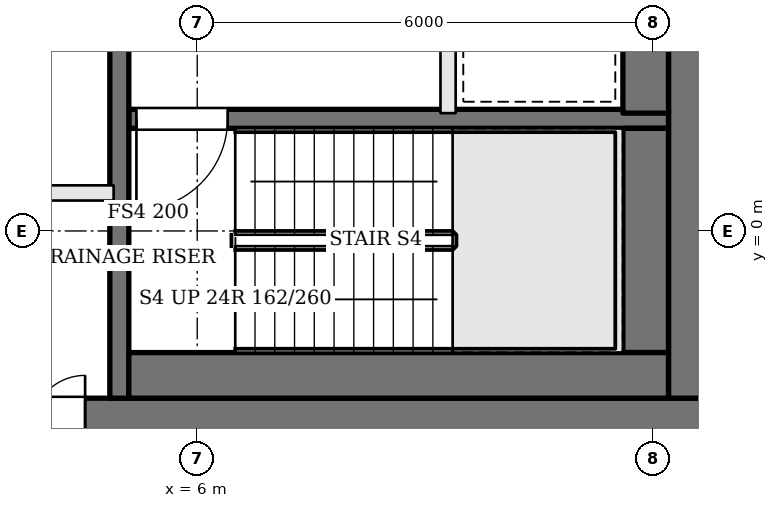
"""IFC4 building model, lengths in metres.
Left out: names, types, materials, properties, quantities, classifications, styles, units other than length and angle.
Written with IfcOpenShell. Run it as: python <this file> out.ifc"""

import sys

from ifc_helpers import new_model, si_unit, direction, frame, frame_2d, origin, place, context, subcontext, project, spatial, rectangle, extrude, element, fill, save


model = new_model("IFC4")
c1 = context("Model", 3, precision=1e-05, world=origin(), true_north=direction((0.0, 1.0)))
c2 = subcontext(c1, "Body", "Model", "MODEL_VIEW")
j1 = project(units=[si_unit("LENGTHUNIT", "METRE"), si_unit("PLANEANGLEUNIT", "RADIAN")], contexts=[c1])
p1 = place(None, origin())
s1 = spatial("IfcSite", under=j1, at=p1, CompositionType="ELEMENT")
p2 = place(p1, origin())
s2 = spatial("IfcBuilding", under=s1, at=p2, CompositionType="ELEMENT")
p3 = place(p2, frame((0.0, 0.0, 252.6)))
s3 = spatial("IfcBuildingStorey", under=s2, at=p3, CompositionType="ELEMENT", Elevation=252.6)
p4 = place(p3, frame((-13.0, -2.6, 0.0), z_axis=(0.0, 0.0, 1.0), x_axis=(1.0, 0.0, 0.0)))
e1 = element("IfcWall", 1, at=p4, inside=s3, PredefinedType="SHEAR", context=c2, shape_type="SweptSolid", body=[
    extrude(rectangle(XDim=26.0, YDim=0.8, at=frame_2d((13.0, 0.0))), origin(), (0.0, 0.0, 1.0), 3.9),
])
p5 = place(p4, frame((9.65, 0.0, 0.0)))
e2 = element("IfcOpeningElement", 2, at=p5, cuts=e1, PredefinedType="OPENING", context=c2, shape_type="SweptSolid", body=[
    extrude(rectangle(XDim=0.9, YDim=2.1, at=frame_2d((0.45, 1.05))), frame((0.0, 0.41, 0.0), z_axis=(0.0, -1.0, 0.0), x_axis=(1.0, 0.0, 0.0)), (0.0, 0.0, 1.0), 0.82),
])
p6 = place(p4, frame((12.925, 0.0, 0.0)))
e3 = element("IfcOpeningElement", 3, at=p6, cuts=e1, PredefinedType="OPENING", context=c2, shape_type="SweptSolid", body=[
    extrude(rectangle(XDim=0.9, YDim=2.1, at=frame_2d((0.45, 1.05))), frame((0.0, 0.41, 0.0), z_axis=(0.0, -1.0, 0.0), x_axis=(1.0, 0.0, 0.0)), (0.0, 0.0, 1.0), 0.82),
])
p7 = place(p4, frame((15.05, 0.0, 0.0)))
e4 = element("IfcOpeningElement", 4, at=p7, cuts=e1, PredefinedType="OPENING", context=c2, shape_type="SweptSolid", body=[
    extrude(rectangle(XDim=1.0, YDim=2.1, at=frame_2d((0.5, 1.05))), frame((0.0, 0.41, 0.0), z_axis=(0.0, -1.0, 0.0), x_axis=(1.0, 0.0, 0.0)), (0.0, 0.0, 1.0), 0.82),
])
p8 = place(p4, frame((16.825, 0.0, 0.0)))
e5 = element("IfcOpeningElement", 5, at=p8, cuts=e1, PredefinedType="OPENING", context=c2, shape_type="SweptSolid", body=[
    extrude(rectangle(XDim=0.7, YDim=2.1, at=frame_2d((0.35, 1.05))), frame((0.0, 0.41, 0.0), z_axis=(0.0, -1.0, 0.0), x_axis=(1.0, 0.0, 0.0)), (0.0, 0.0, 1.0), 0.82),
])
p9 = place(p3, frame((12.6, -2.2, 0.0), z_axis=(0.0, 0.0, 1.0), x_axis=(0.0, 1.0, 0.0)))
e6 = element("IfcWall", 6, at=p9, inside=s3, PredefinedType="SHEAR", context=c2, shape_type="SweptSolid", body=[
    extrude(rectangle(XDim=13.4, YDim=0.8, at=frame_2d((6.7, 0.0))), origin(), (0.0, 0.0, 1.0), 3.9),
])
p10 = place(p9, frame((7.4, 0.0, 0.0)))
e7 = element("IfcOpeningElement", 7, at=p10, cuts=e6, PredefinedType="OPENING", context=c2, shape_type="SweptSolid", body=[
    extrude(rectangle(XDim=1.8, YDim=2.1, at=frame_2d((0.9, 1.05))), frame((0.0, 0.41, 0.0), z_axis=(0.0, -1.0, 0.0), x_axis=(1.0, 0.0, 0.0)), (0.0, 0.0, 1.0), 0.82),
])
p11 = place(p3, frame((12.2, 1.475, 0.0), z_axis=(0.0, 0.0, 1.0), x_axis=(-1.0, 0.0, 0.0)))
e8 = element("IfcWall", 8, at=p11, inside=s3, PredefinedType="SOLIDWALL", context=c2, shape_type="SweptSolid", body=[
    extrude(rectangle(XDim=7.1, YDim=0.25, at=frame_2d((3.55, 0.0))), origin(), (0.0, 0.0, 1.0), 3.7),
])
p12 = place(p11, frame((5.8, 0.0, 0.0)))
e9 = element("IfcOpeningElement", 9, at=p12, cuts=e8, PredefinedType="OPENING", context=c2, shape_type="SweptSolid", body=[
    extrude(rectangle(XDim=1.2, YDim=2.1, at=frame_2d((0.6, 1.05))), frame((0.0, 0.135, 0.0), z_axis=(0.0, -1.0, 0.0), x_axis=(1.0, 0.0, 0.0)), (0.0, 0.0, 1.0), 0.27),
])
p13 = place(p3, frame((9.3, 4.55, 0.0), z_axis=(0.0, 0.0, 1.0), x_axis=(0.0, -1.0, 0.0)))
e10 = element("IfcWall", 10, at=p13, inside=s3, PredefinedType="SOLIDWALL", context=c2, shape_type="SweptSolid", body=[
    extrude(rectangle(XDim=3.0, YDim=0.2, at=frame_2d((1.5, 0.0))), origin(), (0.0, 0.0, 1.0), 3.7),
])
p14 = place(p3, frame((4.975, 11.2, 0.0), z_axis=(0.0, 0.0, 1.0), x_axis=(0.0, -1.0, 0.0)))
e11 = element("IfcWall", 11, at=p14, inside=s3, PredefinedType="SOLIDWALL", context=c2, shape_type="SweptSolid", body=[
    extrude(rectangle(XDim=13.4, YDim=0.25, at=frame_2d((6.7, 0.0))), origin(), (0.0, 0.0, 1.0), 3.7),
])
p15 = place(p14, frame((5.25, 0.0, 0.0)))
e12 = element("IfcOpeningElement", 12, at=p15, cuts=e11, PredefinedType="OPENING", context=c2, shape_type="SweptSolid", body=[
    extrude(rectangle(XDim=1.2, YDim=2.1, at=frame_2d((0.6, 1.05))), frame((0.0, 0.135, 0.0), z_axis=(0.0, -1.0, 0.0), x_axis=(1.0, 0.0, 0.0)), (0.0, 0.0, 1.0), 0.27),
])
p16 = place(p3, frame((11.9, 4.55, 0.0), z_axis=(0.0, 0.0, 1.0), x_axis=(0.0, -1.0, 0.0)))
e13 = element("IfcWall", 13, at=p16, inside=s3, PredefinedType="SOLIDWALL", context=c2, shape_type="SweptSolid", body=[
    extrude(rectangle(XDim=3.0, YDim=0.6, at=frame_2d((1.5, 0.0))), origin(), (0.0, 0.0, 1.0), 3.7),
])
p17 = place(p3, frame((11.9, 1.35, 0.0), z_axis=(0.0, 0.0, 1.0), x_axis=(0.0, -1.0, 0.0)))
e14 = element("IfcWall", 14, at=p17, inside=s3, PredefinedType="SOLIDWALL", context=c2, shape_type="SweptSolid", body=[
    extrude(rectangle(XDim=2.95, YDim=0.6, at=frame_2d((1.475, 0.0))), origin(), (0.0, 0.0, 1.0), 3.7),
])
p18 = place(p3, frame((12.2, -1.9, 0.0), z_axis=(0.0, 0.0, 1.0), x_axis=(-1.0, 0.0, 0.0)))
e15 = element("IfcWall", 15, at=p18, inside=s3, PredefinedType="SOLIDWALL", context=c2, shape_type="SweptSolid", body=[
    extrude(rectangle(XDim=7.1, YDim=0.6, at=frame_2d((3.55, 0.0))), origin(), (0.0, 0.0, 1.0), 3.7),
])
p19 = place(p3, frame((-4.9, 0.5, 0.0), z_axis=(0.0, 0.0, 1.0), x_axis=(1.0, 0.0, 0.0)))
e16 = element("IfcWall", 16, at=p19, inside=s3, PredefinedType="SOLIDWALL", context=c2, shape_type="SweptSolid", body=[
    extrude(rectangle(XDim=9.8, YDim=0.2, at=frame_2d((4.9, 0.0))), origin(), (0.0, 0.0, 1.0), 3.7),
])
p20 = place(p12, origin())
e17 = element("IfcDoor", 17, at=p20, inside=s3, OperationType="SINGLE_SWING_RIGHT", PredefinedType="DOOR", context=c2, shape_type="SweptSolid", body=[
    extrude(rectangle(XDim=1.2, YDim=2.1, at=frame_2d((0.6, 1.05))), frame((0.0, 0.025, 0.0), z_axis=(0.0, -1.0, 0.0), x_axis=(1.0, 0.0, 0.0)), (0.0, 0.0, 1.0), 0.05),
])
fill(e9, e17)
p21 = place(p8, origin())
e18 = element("IfcDoor", 18, at=p21, inside=s3, OperationType="SINGLE_SWING_RIGHT", PredefinedType="DOOR", context=c2, shape_type="SweptSolid", body=[
    extrude(rectangle(XDim=0.7, YDim=2.1, at=frame_2d((0.35, 1.05))), frame((0.0, 0.025, 0.0), z_axis=(0.0, -1.0, 0.0), x_axis=(1.0, 0.0, 0.0)), (0.0, 0.0, 1.0), 0.05),
])
fill(e5, e18)
save(model, sys.argv[1])
